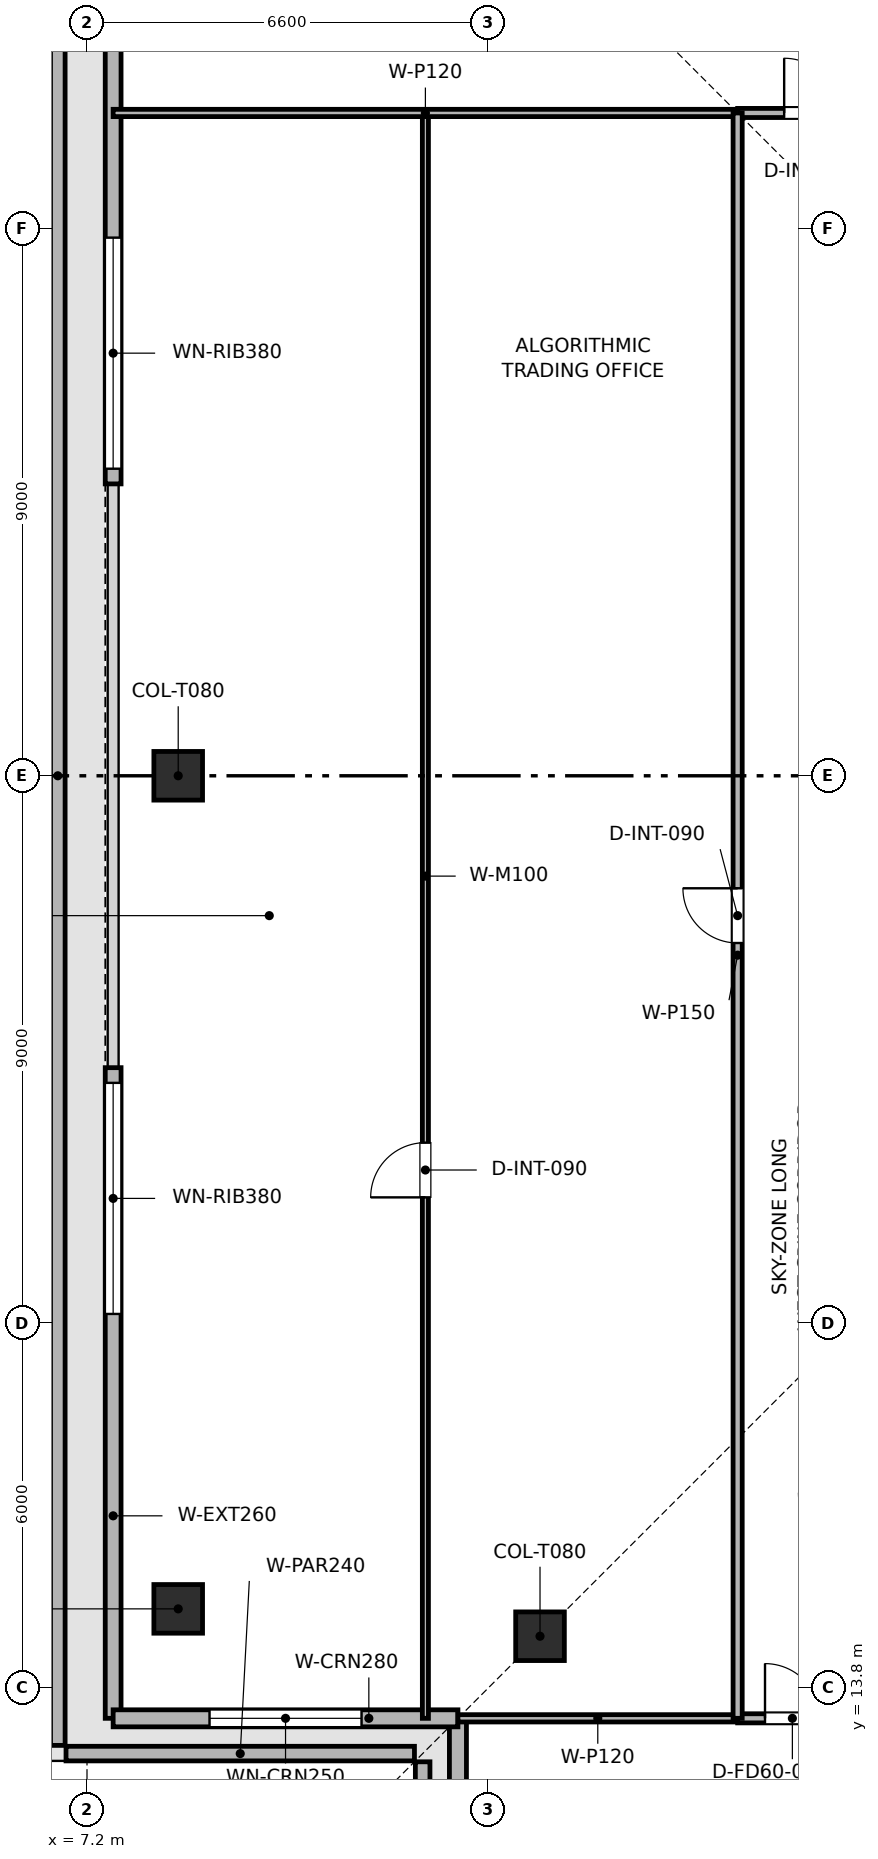
"""IFC4 building model, lengths in metres.
Left out: names, types, materials, properties, quantities, classifications, styles, units other than length and angle.
Written with IfcOpenShell. Run it as: python <this file> out.ifc"""

import sys

from ifc_helpers import new_model, si_unit, direction, frame, frame_2d, origin, origin_2d, place, context, subcontext, project, spatial, rectangle, extrude, element, fill, save


model = new_model("IFC4")
c1 = context("Model", 3, precision=1e-05, world=origin(), true_north=direction((0.0, 1.0)))
c2 = subcontext(c1, "Body", "Model", "MODEL_VIEW")
j1 = project(units=[si_unit("LENGTHUNIT", "METRE"), si_unit("PLANEANGLEUNIT", "RADIAN")], contexts=[c1])
p1 = place(None, origin())
s1 = spatial("IfcSite", under=j1, at=p1, CompositionType="ELEMENT")
p2 = place(p1, origin())
s2 = spatial("IfcBuilding", under=s1, at=p2, CompositionType="ELEMENT")
p3 = place(p2, frame((0.0, 0.0, 344.25)))
s3 = spatial("IfcBuildingStorey", under=s2, at=p3, CompositionType="ELEMENT", Elevation=344.25)
for number, where, z_axis, x_axis in (
    (1, (8.7, 28.8, 0.003), (0.0, 0.0, 1.0), (1.0, 0.0, 0.0)),
    (2, (8.7, 15.1, 0.003), (0.0, 0.0, 1.0), (1.0, 0.0, 0.0)),
    (3, (14.65, 14.65, 0.003), (0.0, 0.0, 1.0), (1.0, 0.0, 0.0)),
):
    element("IfcColumn", number, at=place(p3, frame(where, z_axis=z_axis, x_axis=x_axis)), inside=s3, PredefinedType="COLUMN", context=c2, shape_type="SweptSolid", body=[
        extrude(rectangle(XDim=0.8, YDim=0.8, at=origin_2d()), origin(), (0.0, 0.0, 1.0), 3.504),
    ])
p4 = place(p3, frame((6.72, 44.745, 0.0), z_axis=(0.0, 0.0, 1.0), x_axis=(0.0, -1.0, 0.0)))
e4 = element("IfcWall", 4, at=p4, inside=s3, PredefinedType="PARAPET", context=c2, shape_type="SweptSolid", body=[
    extrude(rectangle(XDim=31.89, YDim=0.24, at=frame_2d((15.945, 0.0))), origin(), (0.0, 0.0, 1.0), 1.2),
])
for number, where, z_axis, x_axis in (
    (5, (6.855, 12.72, 0.0), (0.0, 0.0, 1.0), (1.0, 0.0, 0.0)),
    (6, (12.72, 12.585, 0.0), (0.0, 0.0, 1.0), (0.0, -1.0, 0.0)),
):
    element("IfcWall", number, at=place(p3, frame(where, z_axis=z_axis, x_axis=x_axis)), inside=s3, PredefinedType="PARAPET", context=c2, shape_type="SweptSolid", body=[
        extrude(rectangle(XDim=5.73, YDim=0.24, at=frame_2d((2.865, 0.0))), origin(), (0.0, 0.0, 1.0), 1.2),
    ])
p5 = place(p3, frame((7.63, 13.3, 0.0), z_axis=(0.0, 0.0, 1.0), x_axis=(0.0, 1.0, 0.0)))
e7 = element("IfcWall", 7, at=p5, inside=s3, PredefinedType="SOLIDWALL", context=c2, shape_type="SweptSolid", body=[
    extrude(rectangle(XDim=10.7, YDim=0.26, at=frame_2d((5.35, 0.0))), origin(), (0.0, 0.0, 1.0), 3.51),
])
p6 = place(p5, frame((6.65, 0.0, 0.9)))
e8 = element("IfcOpeningElement", 8, at=p6, cuts=e7, PredefinedType="OPENING", context=c2, shape_type="SweptSolid", body=[
    extrude(rectangle(XDim=3.8, YDim=1.9, at=frame_2d((1.9, 0.95))), frame((0.0, 0.14, 0.0), z_axis=(0.0, -1.0, 0.0), x_axis=(1.0, 0.0, 0.0)), (0.0, 0.0, 1.0), 0.28),
])
p7 = place(p3, frame((7.63, 33.6, 0.0), z_axis=(0.0, 0.0, 1.0), x_axis=(0.0, 1.0, 0.0)))
e9 = element("IfcWall", 9, at=p7, inside=s3, PredefinedType="SOLIDWALL", context=c2, shape_type="SweptSolid", body=[
    extrude(rectangle(XDim=10.7, YDim=0.26, at=frame_2d((5.35, 0.0))), origin(), (0.0, 0.0, 1.0), 3.51),
])
p8 = place(p7, frame((0.25, 0.0, 0.9)))
e10 = element("IfcOpeningElement", 10, at=p8, cuts=e9, PredefinedType="OPENING", context=c2, shape_type="SweptSolid", body=[
    extrude(rectangle(XDim=3.8, YDim=1.9, at=frame_2d((1.9, 0.95))), frame((0.0, 0.14, 0.0), z_axis=(0.0, -1.0, 0.0), x_axis=(1.0, 0.0, 0.0)), (0.0, 0.0, 1.0), 0.28),
])
p9 = place(p3, frame((13.3, 7.63, 0.0), z_axis=(0.0, 0.0, 1.0), x_axis=(0.0, 1.0, 0.0)))
e11 = element("IfcWall", 11, at=p9, inside=s3, PredefinedType="SOLIDWALL", context=c2, shape_type="SweptSolid", body=[
    extrude(rectangle(XDim=5.67, YDim=0.28, at=frame_2d((2.835, 0.0))), origin(), (0.0, 0.0, 1.0), 3.51),
])
p10 = place(p9, frame((1.585, 0.0, 0.9)))
e12 = element("IfcOpeningElement", 12, at=p10, cuts=e11, PredefinedType="OPENING", context=c2, shape_type="SweptSolid", body=[
    extrude(rectangle(XDim=2.5, YDim=1.9, at=frame_2d((1.25, 0.95))), frame((0.0, 0.15, 0.0), z_axis=(0.0, -1.0, 0.0), x_axis=(1.0, 0.0, 0.0)), (0.0, 0.0, 1.0), 0.3),
])
p11 = place(p3, frame((13.3, 13.3, 0.0), z_axis=(0.0, 0.0, 1.0), x_axis=(-1.0, 0.0, 0.0)))
e13 = element("IfcWall", 13, at=p11, inside=s3, PredefinedType="SOLIDWALL", context=c2, shape_type="SweptSolid", body=[
    extrude(rectangle(XDim=5.67, YDim=0.28, at=frame_2d((2.835, 0.0))), origin(), (0.0, 0.0, 1.0), 3.51),
])
p12 = place(p11, frame((1.585, 0.0, 0.9)))
e14 = element("IfcOpeningElement", 14, at=p12, cuts=e13, PredefinedType="OPENING", context=c2, shape_type="SweptSolid", body=[
    extrude(rectangle(XDim=2.5, YDim=1.9, at=frame_2d((1.25, 0.95))), frame((0.0, 0.15, 0.0), z_axis=(0.0, -1.0, 0.0), x_axis=(1.0, 0.0, 0.0)), (0.0, 0.0, 1.0), 0.3),
])
p13 = place(p3, frame((12.765, 13.3, 0.0), z_axis=(0.0, 0.0, 1.0), x_axis=(0.0, 1.0, 0.0)))
e15 = element("IfcWall", 15, at=p13, inside=s3, PredefinedType="MOVABLE", context=c2, shape_type="SweptSolid", body=[
    extrude(rectangle(XDim=26.4, YDim=0.1, at=frame_2d((13.2, 0.0))), origin(), (0.0, 0.0, 1.0), 3.095),
])
p14 = place(p13, frame((8.567, 0.0, 0.0)))
e16 = element("IfcOpeningElement", 16, at=p14, cuts=e15, PredefinedType="OPENING", context=c2, shape_type="SweptSolid", body=[
    extrude(rectangle(XDim=0.9, YDim=2.1, at=frame_2d((0.45, 1.05))), frame((0.0, 0.06, 0.0), z_axis=(0.0, -1.0, 0.0), x_axis=(1.0, 0.0, 0.0)), (0.0, 0.0, 1.0), 0.12),
])
p15 = place(p3, frame((13.3, 13.3, 0.0), z_axis=(0.0, 0.0, 1.0), x_axis=(1.0, 0.0, 0.0)))
e17 = element("IfcWall", 17, at=p15, inside=s3, PredefinedType="PARTITIONING", context=c2, shape_type="SweptSolid", body=[
    extrude(rectangle(XDim=4.6, YDim=0.12, at=frame_2d((2.3, 0.0))), origin(), (0.0, 0.0, 1.0), 3.195),
])
p16 = place(p3, frame((17.9, 13.3, 0.0), z_axis=(0.0, 0.0, 1.0), x_axis=(1.0, 0.0, 0.0)))
e18 = element("IfcWall", 18, at=p16, inside=s3, PredefinedType="PARTITIONING", context=c2, shape_type="SweptSolid", body=[
    extrude(rectangle(XDim=1.9, YDim=0.15, at=frame_2d((0.95, 0.0))), origin(), (0.0, 0.0, 1.0), 3.51),
])
p17 = place(p16, frame((0.45, 0.0, 0.0)))
e19 = element("IfcOpeningElement", 19, at=p17, cuts=e18, PredefinedType="OPENING", context=c2, shape_type="SweptSolid", body=[
    extrude(rectangle(XDim=0.9, YDim=2.1, at=frame_2d((0.45, 1.05))), frame((0.0, 0.085, 0.0), z_axis=(0.0, -1.0, 0.0), x_axis=(1.0, 0.0, 0.0)), (0.0, 0.0, 1.0), 0.17),
])
p18 = place(p3, frame((7.63, 39.7, 0.0), z_axis=(0.0, 0.0, 1.0), x_axis=(1.0, 0.0, 0.0)))
e20 = element("IfcWall", 20, at=p18, inside=s3, PredefinedType="PARTITIONING", context=c2, shape_type="SweptSolid", body=[
    extrude(rectangle(XDim=10.27, YDim=0.12, at=frame_2d((5.135, 0.0))), origin(), (0.0, 0.0, 1.0), 3.095),
])
p19 = place(p3, frame((17.9, 39.7, 0.0), z_axis=(0.0, 0.0, 1.0), x_axis=(1.0, 0.0, 0.0)))
e21 = element("IfcWall", 21, at=p19, inside=s3, PredefinedType="PARTITIONING", context=c2, shape_type="SweptSolid", body=[
    extrude(rectangle(XDim=21.8, YDim=0.15, at=frame_2d((10.9, 0.0))), origin(), (0.0, 0.0, 1.0), 3.095),
])
p20 = place(p19, frame((0.765, 0.0, 0.0)))
e22 = element("IfcOpeningElement", 22, at=p20, cuts=e21, PredefinedType="OPENING", context=c2, shape_type="SweptSolid", body=[
    extrude(rectangle(XDim=0.9, YDim=2.1, at=frame_2d((0.45, 1.05))), frame((0.0, 0.085, 0.0), z_axis=(0.0, -1.0, 0.0), x_axis=(1.0, 0.0, 0.0)), (0.0, 0.0, 1.0), 0.17),
])
p21 = place(p19, frame((6.195, 0.0, 0.0)))
e23 = element("IfcOpeningElement", 23, at=p21, cuts=e21, PredefinedType="OPENING", context=c2, shape_type="SweptSolid", body=[
    extrude(rectangle(XDim=0.9, YDim=2.1, at=frame_2d((0.45, 1.05))), frame((0.0, 0.085, 0.0), z_axis=(0.0, -1.0, 0.0), x_axis=(1.0, 0.0, 0.0)), (0.0, 0.0, 1.0), 0.17),
])
p22 = place(p19, frame((15.88, 0.0, 0.0)))
e24 = element("IfcOpeningElement", 24, at=p22, cuts=e21, PredefinedType="OPENING", context=c2, shape_type="SweptSolid", body=[
    extrude(rectangle(XDim=0.9, YDim=2.1, at=frame_2d((0.45, 1.05))), frame((0.0, 0.085, 0.0), z_axis=(0.0, -1.0, 0.0), x_axis=(1.0, 0.0, 0.0)), (0.0, 0.0, 1.0), 0.17),
])
p23 = place(p3, frame((17.9, 13.3, 0.0), z_axis=(0.0, 0.0, 1.0), x_axis=(0.0, 1.0, 0.0)))
e25 = element("IfcWall", 25, at=p23, inside=s3, PredefinedType="PARTITIONING", context=c2, shape_type="SweptSolid", body=[
    extrude(rectangle(XDim=26.4, YDim=0.15, at=frame_2d((13.2, 0.0))), origin(), (0.0, 0.0, 1.0), 3.095),
])
p24 = place(p23, frame((12.75, 0.0, 0.0)))
e26 = element("IfcOpeningElement", 26, at=p24, cuts=e25, PredefinedType="OPENING", context=c2, shape_type="SweptSolid", body=[
    extrude(rectangle(XDim=0.9, YDim=2.1, at=frame_2d((0.45, 1.05))), frame((0.0, 0.085, 0.0), z_axis=(0.0, -1.0, 0.0), x_axis=(1.0, 0.0, 0.0)), (0.0, 0.0, 1.0), 0.17),
])
p25 = place(p6, origin())
e27 = element("IfcWindow", 27, at=p25, inside=s3, PartitioningType="SINGLE_PANEL", PredefinedType="WINDOW", context=c2, shape_type="SweptSolid", body=[
    extrude(rectangle(XDim=3.8, YDim=1.9, at=frame_2d((1.9, 0.95))), frame((0.0, 0.03, 0.0), z_axis=(0.0, -1.0, 0.0), x_axis=(1.0, 0.0, 0.0)), (0.0, 0.0, 1.0), 0.06),
])
fill(e8, e27)
p26 = place(p8, origin())
e28 = element("IfcWindow", 28, at=p26, inside=s3, PartitioningType="SINGLE_PANEL", PredefinedType="WINDOW", context=c2, shape_type="SweptSolid", body=[
    extrude(rectangle(XDim=3.8, YDim=1.9, at=frame_2d((1.9, 0.95))), frame((0.0, 0.03, 0.0), z_axis=(0.0, -1.0, 0.0), x_axis=(1.0, 0.0, 0.0)), (0.0, 0.0, 1.0), 0.06),
])
fill(e10, e28)
p27 = place(p12, origin())
e29 = element("IfcWindow", 29, at=p27, inside=s3, PartitioningType="SINGLE_PANEL", PredefinedType="WINDOW", context=c2, shape_type="SweptSolid", body=[
    extrude(rectangle(XDim=2.5, YDim=1.9, at=frame_2d((1.25, 0.95))), frame((0.0, 0.03, 0.0), z_axis=(0.0, -1.0, 0.0), x_axis=(1.0, 0.0, 0.0)), (0.0, 0.0, 1.0), 0.06),
])
fill(e14, e29)
p28 = place(p14, origin())
e30 = element("IfcDoor", 30, at=p28, inside=s3, OperationType="SINGLE_SWING_LEFT", PredefinedType="DOOR", context=c2, shape_type="SweptSolid", body=[
    extrude(rectangle(XDim=0.9, YDim=2.1, at=frame_2d((0.45, 1.05))), frame((0.0, 0.025, 0.0), z_axis=(0.0, -1.0, 0.0), x_axis=(1.0, 0.0, 0.0)), (0.0, 0.0, 1.0), 0.05),
])
fill(e16, e30)
p29 = place(p17, origin())
e31 = element("IfcDoor", 31, at=p29, inside=s3, OperationType="SINGLE_SWING_LEFT", PredefinedType="DOOR", context=c2, shape_type="SweptSolid", body=[
    extrude(rectangle(XDim=0.9, YDim=2.1, at=frame_2d((0.45, 1.05))), frame((0.0, 0.025, 0.0), z_axis=(0.0, -1.0, 0.0), x_axis=(1.0, 0.0, 0.0)), (0.0, 0.0, 1.0), 0.05),
])
fill(e19, e31)
p30 = place(p20, origin())
e32 = element("IfcDoor", 32, at=p30, inside=s3, OperationType="SINGLE_SWING_LEFT", PredefinedType="DOOR", context=c2, shape_type="SweptSolid", body=[
    extrude(rectangle(XDim=0.9, YDim=2.1, at=frame_2d((0.45, 1.05))), frame((0.0, 0.025, 0.0), z_axis=(0.0, -1.0, 0.0), x_axis=(1.0, 0.0, 0.0)), (0.0, 0.0, 1.0), 0.05),
])
fill(e22, e32)
p31 = place(p24, origin())
e33 = element("IfcDoor", 33, at=p31, inside=s3, OperationType="SINGLE_SWING_RIGHT", PredefinedType="DOOR", context=c2, shape_type="SweptSolid", body=[
    extrude(rectangle(XDim=0.9, YDim=2.1, at=frame_2d((0.45, 1.05))), frame((0.0, 0.025, 0.0), z_axis=(0.0, -1.0, 0.0), x_axis=(1.0, 0.0, 0.0)), (0.0, 0.0, 1.0), 0.05),
])
fill(e26, e33)
save(model, sys.argv[1])
